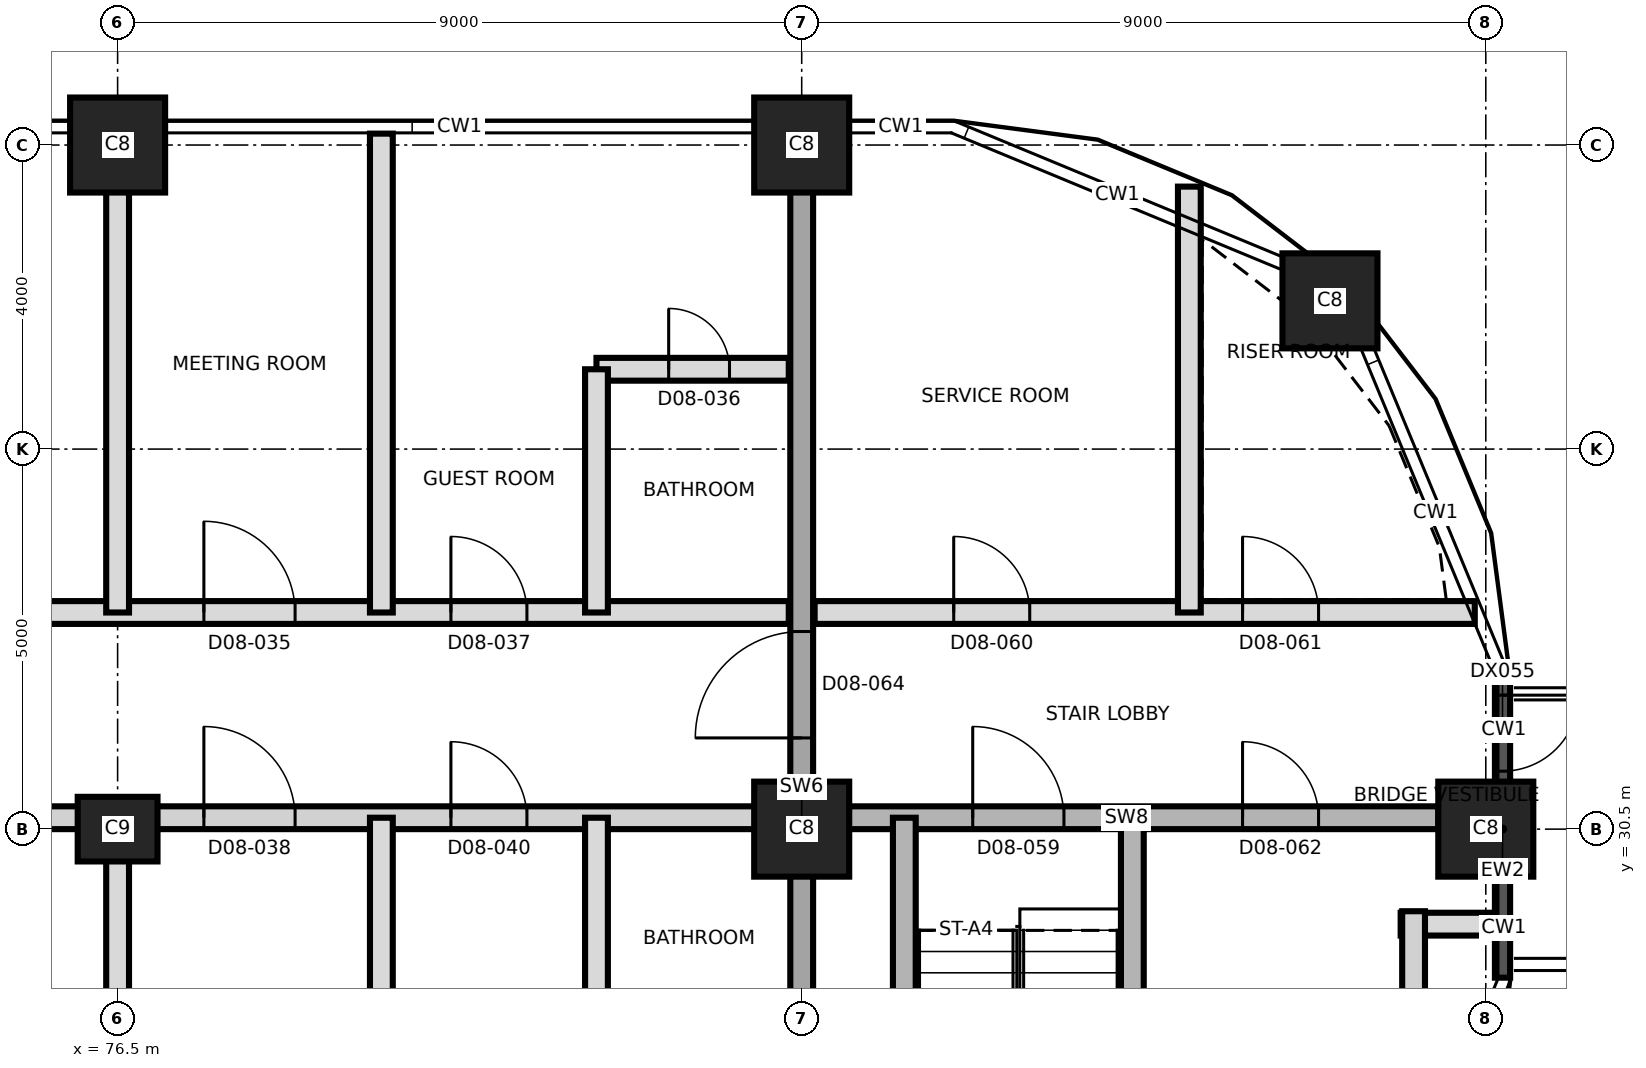
"""IFC4 building model, lengths in metres.
Left out: names, types, materials, properties, quantities, classifications, styles, units other than length and angle.
Written with IfcOpenShell. Run it as: python <this file> out.ifc"""

import sys

from ifc_helpers import new_model, si_unit, direction, frame, frame_2d, origin, origin_2d, place, context, subcontext, project, spatial, rectangle, extrude, element, fill, save


model = new_model("IFC4")
c1 = context("Model", 3, precision=1e-05, world=origin(), true_north=direction((0.0, 1.0)))
c2 = subcontext(c1, "Body", "Model", "MODEL_VIEW")
j1 = project(units=[si_unit("LENGTHUNIT", "METRE"), si_unit("PLANEANGLEUNIT", "RADIAN")], contexts=[c1])
p1 = place(None, origin())
s1 = spatial("IfcSite", under=j1, at=p1, CompositionType="ELEMENT")
p2 = place(p1, origin())
s2 = spatial("IfcBuilding", under=s1, at=p2, CompositionType="ELEMENT")
p3 = place(p2, frame((0.0, 0.0, 101.9)))
s3 = spatial("IfcBuildingStorey", under=s2, at=p3, CompositionType="ELEMENT", Elevation=101.9)
p4 = place(p3, frame((76.5, 30.5, 0.0), z_axis=(0.0, 0.0, 1.0), x_axis=(1.0, 0.0, 0.0)))
e1 = element("IfcColumn", 1, at=p4, inside=s3, PredefinedType="COLUMN", context=c2, shape_type="SweptSolid", body=[
    extrude(rectangle(XDim=1.05, YDim=0.85, at=origin_2d()), origin(), (0.0, 0.0, 1.0), 3.7),
])
for number, where, z_axis, x_axis in (
    (2, (85.5, 30.5, 0.0), (0.0, 0.0, 1.0), (1.0, 0.0, 0.0)),
    (3, (94.5, 30.5, 0.0), (0.0, 0.0, 1.0), (1.0, 0.0, 0.0)),
    (4, (92.45, 37.45, 0.0), (0.0, 0.0, 1.0), (1.0, 0.0, 0.0)),
    (5, (76.5, 39.5, 0.0), (0.0, 0.0, 1.0), (1.0, 0.0, 0.0)),
    (6, (85.5, 39.5, 0.0), (0.0, 0.0, 1.0), (1.0, 0.0, 0.0)),
):
    element("IfcColumn", number, at=place(p3, frame(where, z_axis=z_axis, x_axis=x_axis)), inside=s3, PredefinedType="COLUMN", context=c2, shape_type="SweptSolid", body=[
        extrude(rectangle(XDim=1.25, YDim=1.25, at=origin_2d()), origin(), (0.0, 0.0, 1.0), 3.7),
    ])
p5 = place(p3, frame((85.5, 21.53, 0.0), z_axis=(0.0, 0.0, 1.0), x_axis=(0.0, 1.0, 0.0)))
e7 = element("IfcWall", 7, at=p5, inside=s3, PredefinedType="SHEAR", context=c2, shape_type="SweptSolid", body=[
    extrude(rectangle(XDim=17.94, YDim=0.3, at=frame_2d((8.97, 0.0))), origin(), (0.0, 0.0, 1.0), 3.7),
])
p6 = place(p5, frame((10.17, 0.0, 0.0)))
e8 = element("IfcOpeningElement", 8, at=p6, cuts=e7, PredefinedType="OPENING", context=c2, shape_type="SweptSolid", body=[
    extrude(rectangle(XDim=1.4, YDim=2.1, at=frame_2d((0.7, 1.05))), frame((0.0, 0.16, 0.0), z_axis=(0.0, -1.0, 0.0), x_axis=(1.0, 0.0, 0.0)), (0.0, 0.0, 1.0), 0.32),
])
p7 = place(p3, frame((94.72, 32.454, 0.0), z_axis=(0.0, 0.0, 1.0), x_axis=(0.0, -1.0, 0.0)))
e9 = element("IfcWall", 9, at=p7, inside=s3, PredefinedType="SOLIDWALL", context=c2, shape_type="SweptSolid", body=[
    extrude(rectangle(XDim=3.908, YDim=0.2, at=frame_2d((1.954, 0.0))), origin(), (0.0, 0.0, 1.0), 3.1),
])
p8 = place(p7, frame((0.191, 0.0, 0.0)))
e10 = element("IfcOpeningElement", 10, at=p8, cuts=e9, PredefinedType="OPENING", context=c2, shape_type="SweptSolid", body=[
    extrude(rectangle(XDim=1.0, YDim=2.4, at=frame_2d((0.5, 1.2))), frame((0.0, 0.11, 0.0), z_axis=(0.0, -1.0, 0.0), x_axis=(1.0, 0.0, 0.0)), (0.0, 0.0, 1.0), 0.22),
])
p9 = place(p3, frame((93.38, 29.25, 0.0), z_axis=(0.0, 0.0, 1.0), x_axis=(1.0, 0.0, 0.0)))
e11 = element("IfcWall", 11, at=p9, inside=s3, PredefinedType="PARTITIONING", context=c2, shape_type="SweptSolid", body=[
    extrude(rectangle(XDim=1.23, YDim=0.3, at=frame_2d((0.615, 0.0))), origin(), (0.0, 0.0, 1.0), 3.4),
])
p10 = place(p3, frame((58.8, 30.65, 0.0), z_axis=(0.0, 0.0, 1.0), x_axis=(1.0, 0.0, 0.0)))
e12 = element("IfcWall", 12, at=p10, inside=s3, PredefinedType="PARTITIONING", context=c2, shape_type="SweptSolid", body=[
    extrude(rectangle(XDim=26.53, YDim=0.3, at=frame_2d((13.265, 0.0))), origin(), (0.0, 0.0, 1.0), 3.4),
])
p11 = place(p10, frame((2.05, 0.0, 0.0)))
e13 = element("IfcOpeningElement", 13, at=p11, cuts=e12, PredefinedType="OPENING", context=c2, shape_type="SweptSolid", body=[
    extrude(rectangle(XDim=1.0, YDim=2.4, at=frame_2d((0.5, 1.2))), frame((0.0, 0.16, 0.0), z_axis=(0.0, -1.0, 0.0), x_axis=(1.0, 0.0, 0.0)), (0.0, 0.0, 1.0), 0.32),
])
p12 = place(p10, frame((9.85, 0.0, 0.0)))
e14 = element("IfcOpeningElement", 14, at=p12, cuts=e12, PredefinedType="OPENING", context=c2, shape_type="SweptSolid", body=[
    extrude(rectangle(XDim=1.0, YDim=2.1, at=frame_2d((0.5, 1.05))), frame((0.0, 0.16, 0.0), z_axis=(0.0, -1.0, 0.0), x_axis=(1.0, 0.0, 0.0)), (0.0, 0.0, 1.0), 0.32),
])
p13 = place(p10, frame((15.7, 0.0, 0.0)))
e15 = element("IfcOpeningElement", 15, at=p13, cuts=e12, PredefinedType="OPENING", context=c2, shape_type="SweptSolid", body=[
    extrude(rectangle(XDim=1.0, YDim=2.1, at=frame_2d((0.5, 1.05))), frame((0.0, 0.16, 0.0), z_axis=(0.0, -1.0, 0.0), x_axis=(1.0, 0.0, 0.0)), (0.0, 0.0, 1.0), 0.32),
])
p14 = place(p10, frame((18.835, 0.0, 0.0)))
e16 = element("IfcOpeningElement", 16, at=p14, cuts=e12, PredefinedType="OPENING", context=c2, shape_type="SweptSolid", body=[
    extrude(rectangle(XDim=1.2, YDim=2.1, at=frame_2d((0.6, 1.05))), frame((0.0, 0.16, 0.0), z_axis=(0.0, -1.0, 0.0), x_axis=(1.0, 0.0, 0.0)), (0.0, 0.0, 1.0), 0.32),
])
p15 = place(p10, frame((22.085, 0.0, 0.0)))
e17 = element("IfcOpeningElement", 17, at=p15, cuts=e12, PredefinedType="OPENING", context=c2, shape_type="SweptSolid", body=[
    extrude(rectangle(XDim=1.0, YDim=2.1, at=frame_2d((0.5, 1.05))), frame((0.0, 0.16, 0.0), z_axis=(0.0, -1.0, 0.0), x_axis=(1.0, 0.0, 0.0)), (0.0, 0.0, 1.0), 0.32),
])
p16 = place(p3, frame((85.67, 30.65, 0.0), z_axis=(0.0, 0.0, 1.0), x_axis=(1.0, 0.0, 0.0)))
e18 = element("IfcWall", 18, at=p16, inside=s3, PredefinedType="SHEAR", context=c2, shape_type="SweptSolid", body=[
    extrude(rectangle(XDim=8.205, YDim=0.3, at=frame_2d((4.103, 0.0))), origin(), (0.0, 0.0, 1.0), 3.4),
])
p17 = place(p16, frame((2.08, 0.0, 0.0)))
e19 = element("IfcOpeningElement", 19, at=p17, cuts=e18, PredefinedType="OPENING", context=c2, shape_type="SweptSolid", body=[
    extrude(rectangle(XDim=1.2, YDim=2.1, at=frame_2d((0.6, 1.05))), frame((0.0, 0.16, 0.0), z_axis=(0.0, -1.0, 0.0), x_axis=(1.0, 0.0, 0.0)), (0.0, 0.0, 1.0), 0.32),
])
p18 = place(p16, frame((5.63, 0.0, 0.0)))
e20 = element("IfcOpeningElement", 20, at=p18, cuts=e18, PredefinedType="OPENING", context=c2, shape_type="SweptSolid", body=[
    extrude(rectangle(XDim=1.0, YDim=2.1, at=frame_2d((0.5, 1.05))), frame((0.0, 0.16, 0.0), z_axis=(0.0, -1.0, 0.0), x_axis=(1.0, 0.0, 0.0)), (0.0, 0.0, 1.0), 0.32),
])
p19 = place(p3, frame((58.8, 33.35, 0.0), z_axis=(0.0, 0.0, 1.0), x_axis=(1.0, 0.0, 0.0)))
e21 = element("IfcWall", 21, at=p19, inside=s3, PredefinedType="PARTITIONING", context=c2, shape_type="SweptSolid", body=[
    extrude(rectangle(XDim=26.53, YDim=0.3, at=frame_2d((13.265, 0.0))), origin(), (0.0, 0.0, 1.0), 3.4),
])
p20 = place(p19, frame((2.75, 0.0, 0.0)))
e22 = element("IfcOpeningElement", 22, at=p20, cuts=e21, PredefinedType="OPENING", context=c2, shape_type="SweptSolid", body=[
    extrude(rectangle(XDim=1.0, YDim=2.1, at=frame_2d((0.5, 1.05))), frame((0.0, 0.16, 0.0), z_axis=(0.0, -1.0, 0.0), x_axis=(1.0, 0.0, 0.0)), (0.0, 0.0, 1.0), 0.32),
])
p21 = place(p19, frame((5.7, 0.0, 0.0)))
e23 = element("IfcOpeningElement", 23, at=p21, cuts=e21, PredefinedType="OPENING", context=c2, shape_type="SweptSolid", body=[
    extrude(rectangle(XDim=1.4, YDim=2.1, at=frame_2d((0.7, 1.05))), frame((0.0, 0.16, 0.0), z_axis=(0.0, -1.0, 0.0), x_axis=(1.0, 0.0, 0.0)), (0.0, 0.0, 1.0), 0.32),
])
p22 = place(p19, frame((14.35, 0.0, 0.0)))
e24 = element("IfcOpeningElement", 24, at=p22, cuts=e21, PredefinedType="OPENING", context=c2, shape_type="SweptSolid", body=[
    extrude(rectangle(XDim=1.0, YDim=2.4, at=frame_2d((0.5, 1.2))), frame((0.0, 0.16, 0.0), z_axis=(0.0, -1.0, 0.0), x_axis=(1.0, 0.0, 0.0)), (0.0, 0.0, 1.0), 0.32),
])
p23 = place(p19, frame((18.835, 0.0, 0.0)))
e25 = element("IfcOpeningElement", 25, at=p23, cuts=e21, PredefinedType="OPENING", context=c2, shape_type="SweptSolid", body=[
    extrude(rectangle(XDim=1.2, YDim=2.1, at=frame_2d((0.6, 1.05))), frame((0.0, 0.16, 0.0), z_axis=(0.0, -1.0, 0.0), x_axis=(1.0, 0.0, 0.0)), (0.0, 0.0, 1.0), 0.32),
])
p24 = place(p19, frame((22.085, 0.0, 0.0)))
e26 = element("IfcOpeningElement", 26, at=p24, cuts=e21, PredefinedType="OPENING", context=c2, shape_type="SweptSolid", body=[
    extrude(rectangle(XDim=1.0, YDim=2.1, at=frame_2d((0.5, 1.05))), frame((0.0, 0.16, 0.0), z_axis=(0.0, -1.0, 0.0), x_axis=(1.0, 0.0, 0.0)), (0.0, 0.0, 1.0), 0.32),
])
p25 = place(p3, frame((85.67, 33.35, 0.0), z_axis=(0.0, 0.0, 1.0), x_axis=(1.0, 0.0, 0.0)))
e27 = element("IfcWall", 27, at=p25, inside=s3, PredefinedType="PARTITIONING", context=c2, shape_type="SweptSolid", body=[
    extrude(rectangle(XDim=8.685, YDim=0.3, at=frame_2d((4.343, 0.0))), origin(), (0.0, 0.0, 1.0), 3.4),
])
p26 = place(p25, frame((1.83, 0.0, 0.0)))
e28 = element("IfcOpeningElement", 28, at=p26, cuts=e27, PredefinedType="OPENING", context=c2, shape_type="SweptSolid", body=[
    extrude(rectangle(XDim=1.0, YDim=2.1, at=frame_2d((0.5, 1.05))), frame((0.0, 0.16, 0.0), z_axis=(0.0, -1.0, 0.0), x_axis=(1.0, 0.0, 0.0)), (0.0, 0.0, 1.0), 0.32),
])
p27 = place(p25, frame((5.63, 0.0, 0.0)))
e29 = element("IfcOpeningElement", 29, at=p27, cuts=e27, PredefinedType="OPENING", context=c2, shape_type="SweptSolid", body=[
    extrude(rectangle(XDim=1.0, YDim=2.1, at=frame_2d((0.5, 1.05))), frame((0.0, 0.16, 0.0), z_axis=(0.0, -1.0, 0.0), x_axis=(1.0, 0.0, 0.0)), (0.0, 0.0, 1.0), 0.32),
])
p28 = place(p3, frame((82.8, 36.55, 0.0), z_axis=(0.0, 0.0, 1.0), x_axis=(1.0, 0.0, 0.0)))
e30 = element("IfcWall", 30, at=p28, inside=s3, PredefinedType="PARTITIONING", context=c2, shape_type="SweptSolid", body=[
    extrude(rectangle(XDim=2.53, YDim=0.3, at=frame_2d((1.265, 0.0))), origin(), (0.0, 0.0, 1.0), 3.4),
])
p29 = place(p28, frame((0.95, 0.0, 0.0)))
e31 = element("IfcOpeningElement", 31, at=p29, cuts=e30, PredefinedType="OPENING", context=c2, shape_type="SweptSolid", body=[
    extrude(rectangle(XDim=0.8, YDim=2.1, at=frame_2d((0.4, 1.05))), frame((0.0, 0.16, 0.0), z_axis=(0.0, -1.0, 0.0), x_axis=(1.0, 0.0, 0.0)), (0.0, 0.0, 1.0), 0.32),
])
p30 = place(p3, frame((76.5, 21.53, 0.0), z_axis=(0.0, 0.0, 1.0), x_axis=(0.0, 1.0, 0.0)))
e32 = element("IfcWall", 32, at=p30, inside=s3, PredefinedType="PARTITIONING", context=c2, shape_type="SweptSolid", body=[
    extrude(rectangle(XDim=9.12, YDim=0.3, at=frame_2d((4.56, 0.0))), origin(), (0.0, 0.0, 1.0), 3.4),
])
p31 = place(p3, frame((76.5, 33.35, 0.0), z_axis=(0.0, 0.0, 1.0), x_axis=(0.0, 1.0, 0.0)))
e33 = element("IfcWall", 33, at=p31, inside=s3, PredefinedType="PARTITIONING", context=c2, shape_type="SweptSolid", body=[
    extrude(rectangle(XDim=6.12, YDim=0.3, at=frame_2d((3.06, 0.0))), origin(), (0.0, 0.0, 1.0), 3.4),
])
p32 = place(p3, frame((79.97, 21.53, 0.0), z_axis=(0.0, 0.0, 1.0), x_axis=(0.0, 1.0, 0.0)))
e34 = element("IfcWall", 34, at=p32, inside=s3, PredefinedType="PARTITIONING", context=c2, shape_type="SweptSolid", body=[
    extrude(rectangle(XDim=9.12, YDim=0.3, at=frame_2d((4.56, 0.0))), origin(), (0.0, 0.0, 1.0), 3.4),
])
p33 = place(p3, frame((79.97, 33.35, 0.0), z_axis=(0.0, 0.0, 1.0), x_axis=(0.0, 1.0, 0.0)))
e35 = element("IfcWall", 35, at=p33, inside=s3, PredefinedType="PARTITIONING", context=c2, shape_type="SweptSolid", body=[
    extrude(rectangle(XDim=6.3, YDim=0.3, at=frame_2d((3.15, 0.0))), origin(), (0.0, 0.0, 1.0), 3.4),
])
for number, where, z_axis, x_axis in (
    (36, (82.8, 27.45, 0.0), (0.0, 0.0, 1.0), (0.0, 1.0, 0.0)),
    (37, (82.8, 33.35, 0.0), (0.0, 0.0, 1.0), (0.0, 1.0, 0.0)),
):
    element("IfcWall", number, at=place(p3, frame(where, z_axis=z_axis, x_axis=x_axis)), inside=s3, PredefinedType="PARTITIONING", context=c2, shape_type="SweptSolid", body=[
        extrude(rectangle(XDim=3.2, YDim=0.3, at=frame_2d((1.6, 0.0))), origin(), (0.0, 0.0, 1.0), 3.4),
    ])
p34 = place(p3, frame((86.85, 21.8, 0.0), z_axis=(0.0, 0.0, 1.0), x_axis=(0.0, 1.0, 0.0)))
e38 = element("IfcWall", 38, at=p34, inside=s3, PredefinedType="SHEAR", context=c2, shape_type="SweptSolid", body=[
    extrude(rectangle(XDim=8.85, YDim=0.3, at=frame_2d((4.425, 0.0))), origin(), (0.0, 0.0, 1.0), 3.4),
])
p35 = place(p3, frame((89.85, 21.997, 0.0), z_axis=(0.0, 0.0, 1.0), x_axis=(0.0, 1.0, 0.0)))
e39 = element("IfcWall", 39, at=p35, inside=s3, PredefinedType="SHEAR", context=c2, shape_type="SweptSolid", body=[
    extrude(rectangle(XDim=8.653, YDim=0.3, at=frame_2d((4.326, 0.0))), origin(), (0.0, 0.0, 1.0), 3.4),
])
p36 = place(p3, frame((90.6, 33.35, 0.0), z_axis=(0.0, 0.0, 1.0), x_axis=(0.0, 1.0, 0.0)))
e40 = element("IfcWall", 40, at=p36, inside=s3, PredefinedType="PARTITIONING", context=c2, shape_type="SweptSolid", body=[
    extrude(rectangle(XDim=5.603, YDim=0.3, at=frame_2d((2.801, 0.0))), origin(), (0.0, 0.0, 1.0), 3.4),
])
p37 = place(p3, frame((93.55, 24.637, 0.0), z_axis=(0.0, 0.0, 1.0), x_axis=(0.0, 1.0, 0.0)))
e41 = element("IfcWall", 41, at=p37, inside=s3, PredefinedType="PARTITIONING", context=c2, shape_type="SweptSolid", body=[
    extrude(rectangle(XDim=4.783, YDim=0.3, at=frame_2d((2.392, 0.0))), origin(), (0.0, 0.0, 1.0), 3.4),
])
p38 = place(p8, origin())
e42 = element("IfcDoor", 42, at=p38, inside=s3, OperationType="SINGLE_SWING_LEFT", PredefinedType="DOOR", context=c2, shape_type="SweptSolid", body=[
    extrude(rectangle(XDim=1.0, YDim=2.4, at=frame_2d((0.5, 1.2))), frame((0.0, 0.025, 0.0), z_axis=(0.0, -1.0, 0.0), x_axis=(1.0, 0.0, 0.0)), (0.0, 0.0, 1.0), 0.05),
])
fill(e10, e42)
p39 = place(p23, origin())
e43 = element("IfcDoor", 43, at=p39, inside=s3, OperationType="SINGLE_SWING_LEFT", PredefinedType="DOOR", context=c2, shape_type="SweptSolid", body=[
    extrude(rectangle(XDim=1.2, YDim=2.1, at=frame_2d((0.6, 1.05))), frame((0.0, 0.025, 0.0), z_axis=(0.0, -1.0, 0.0), x_axis=(1.0, 0.0, 0.0)), (0.0, 0.0, 1.0), 0.05),
])
fill(e25, e43)
p40 = place(p29, origin())
e44 = element("IfcDoor", 44, at=p40, inside=s3, OperationType="SINGLE_SWING_LEFT", PredefinedType="DOOR", context=c2, shape_type="SweptSolid", body=[
    extrude(rectangle(XDim=0.8, YDim=2.1, at=frame_2d((0.4, 1.05))), frame((0.0, 0.025, 0.0), z_axis=(0.0, -1.0, 0.0), x_axis=(1.0, 0.0, 0.0)), (0.0, 0.0, 1.0), 0.05),
])
fill(e31, e44)
p41 = place(p24, origin())
e45 = element("IfcDoor", 45, at=p41, inside=s3, OperationType="SINGLE_SWING_RIGHT", PredefinedType="DOOR", context=c2, shape_type="SweptSolid", body=[
    extrude(rectangle(XDim=1.0, YDim=2.1, at=frame_2d((0.5, 1.05))), frame((0.0, 0.025, 0.0), z_axis=(0.0, -1.0, 0.0), x_axis=(1.0, 0.0, 0.0)), (0.0, 0.0, 1.0), 0.05),
])
fill(e26, e45)
p42 = place(p14, origin())
e46 = element("IfcDoor", 46, at=p42, inside=s3, OperationType="SINGLE_SWING_LEFT", PredefinedType="DOOR", context=c2, shape_type="SweptSolid", body=[
    extrude(rectangle(XDim=1.2, YDim=2.1, at=frame_2d((0.6, 1.05))), frame((0.0, 0.025, 0.0), z_axis=(0.0, -1.0, 0.0), x_axis=(1.0, 0.0, 0.0)), (0.0, 0.0, 1.0), 0.05),
])
fill(e16, e46)
p43 = place(p15, origin())
e47 = element("IfcDoor", 47, at=p43, inside=s3, OperationType="SINGLE_SWING_RIGHT", PredefinedType="DOOR", context=c2, shape_type="SweptSolid", body=[
    extrude(rectangle(XDim=1.0, YDim=2.1, at=frame_2d((0.5, 1.05))), frame((0.0, 0.025, 0.0), z_axis=(0.0, -1.0, 0.0), x_axis=(1.0, 0.0, 0.0)), (0.0, 0.0, 1.0), 0.05),
])
fill(e17, e47)
p44 = place(p17, origin())
e48 = element("IfcDoor", 48, at=p44, inside=s3, OperationType="SINGLE_SWING_LEFT", PredefinedType="DOOR", context=c2, shape_type="SweptSolid", body=[
    extrude(rectangle(XDim=1.2, YDim=2.1, at=frame_2d((0.6, 1.05))), frame((0.0, 0.025, 0.0), z_axis=(0.0, -1.0, 0.0), x_axis=(1.0, 0.0, 0.0)), (0.0, 0.0, 1.0), 0.05),
])
fill(e19, e48)
p45 = place(p26, origin())
e49 = element("IfcDoor", 49, at=p45, inside=s3, OperationType="SINGLE_SWING_LEFT", PredefinedType="DOOR", context=c2, shape_type="SweptSolid", body=[
    extrude(rectangle(XDim=1.0, YDim=2.1, at=frame_2d((0.5, 1.05))), frame((0.0, 0.025, 0.0), z_axis=(0.0, -1.0, 0.0), x_axis=(1.0, 0.0, 0.0)), (0.0, 0.0, 1.0), 0.05),
])
fill(e28, e49)
p46 = place(p27, origin())
e50 = element("IfcDoor", 50, at=p46, inside=s3, OperationType="SINGLE_SWING_RIGHT", PredefinedType="DOOR", context=c2, shape_type="SweptSolid", body=[
    extrude(rectangle(XDim=1.0, YDim=2.1, at=frame_2d((0.5, 1.05))), frame((0.0, 0.025, 0.0), z_axis=(0.0, -1.0, 0.0), x_axis=(1.0, 0.0, 0.0)), (0.0, 0.0, 1.0), 0.05),
])
fill(e29, e50)
p47 = place(p18, origin())
e51 = element("IfcDoor", 51, at=p47, inside=s3, OperationType="SINGLE_SWING_LEFT", PredefinedType="DOOR", context=c2, shape_type="SweptSolid", body=[
    extrude(rectangle(XDim=1.0, YDim=2.1, at=frame_2d((0.5, 1.05))), frame((0.0, 0.025, 0.0), z_axis=(0.0, -1.0, 0.0), x_axis=(1.0, 0.0, 0.0)), (0.0, 0.0, 1.0), 0.05),
])
fill(e20, e51)
p48 = place(p6, origin())
e52 = element("IfcDoor", 52, at=p48, inside=s3, OperationType="SINGLE_SWING_RIGHT", PredefinedType="DOOR", context=c2, shape_type="SweptSolid", body=[
    extrude(rectangle(XDim=1.4, YDim=2.1, at=frame_2d((0.7, 1.05))), frame((0.0, 0.025, 0.0), z_axis=(0.0, -1.0, 0.0), x_axis=(1.0, 0.0, 0.0)), (0.0, 0.0, 1.0), 0.05),
])
fill(e8, e52)
save(model, sys.argv[1])
